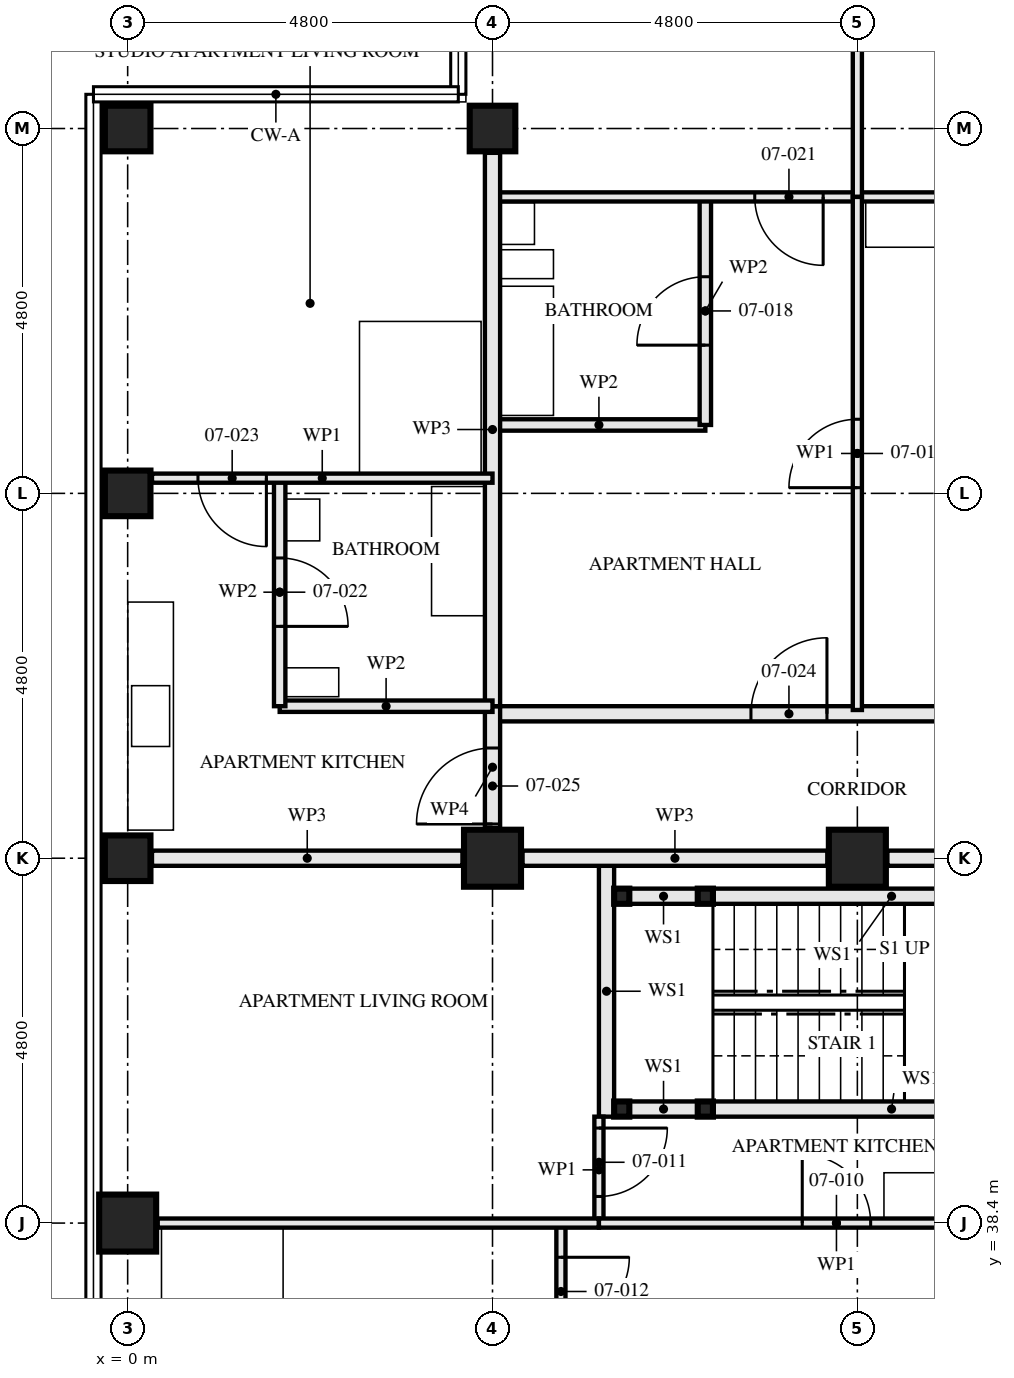
"""IFC4 building model, lengths in metres.
Left out: names, types, materials, properties, quantities, classifications, styles, units other than length and angle.
Written with IfcOpenShell. Run it as: python <this file> out.ifc"""

import sys

from ifc_helpers import new_model, si_unit, direction, frame, frame_2d, origin, origin_2d, place, context, subcontext, project, spatial, rectangle, hollow_rectangle, extrude, element, fill, save


model = new_model("IFC4")
c1 = context("Model", 3, precision=1e-05, world=origin(), true_north=direction((0.0, 1.0)))
c2 = subcontext(c1, "Body", "Model", "MODEL_VIEW")
j1 = project(units=[si_unit("LENGTHUNIT", "METRE"), si_unit("PLANEANGLEUNIT", "RADIAN")], contexts=[c1])
p1 = place(None, origin())
s1 = spatial("IfcSite", under=j1, at=p1, CompositionType="ELEMENT")
p2 = place(p1, origin())
s2 = spatial("IfcBuilding", under=s1, at=p2, CompositionType="ELEMENT")
p3 = place(p2, frame((0.0, 0.0, 30.5)))
s3 = spatial("IfcBuildingStorey", under=s2, at=p3, CompositionType="ELEMENT", Elevation=30.5)
p4 = place(p3, frame((0.0, 38.4, 0.0), z_axis=(0.0, 0.0, 1.0), x_axis=(1.0, 0.0, 0.0)))
e1 = element("IfcColumn", 1, at=p4, inside=s3, PredefinedType="COLUMN", context=c2, shape_type="SweptSolid", body=[
    extrude(hollow_rectangle(XDim=0.75, YDim=0.75, WallThickness=0.08, at=origin_2d()), origin(), (0.0, 0.0, 1.0), 3.5),
])
for number, where, z_axis, x_axis in (
    (2, (0.0, 43.2, 0.0), (0.0, 0.0, 1.0), (0.0, 1.0, 0.0)),
    (3, (0.0, 48.0, 0.0), (0.0, 0.0, 1.0), (1.0, 0.0, 0.0)),
    (4, (0.0, 52.8, 0.0), (0.0, 0.0, 1.0), (0.0, 1.0, 0.0)),
):
    element("IfcColumn", number, at=place(p3, frame(where, z_axis=z_axis, x_axis=x_axis)), inside=s3, PredefinedType="COLUMN", context=c2, shape_type="SweptSolid", body=[
        extrude(hollow_rectangle(XDim=0.6, YDim=0.6, WallThickness=0.08, at=origin_2d()), origin(), (0.0, 0.0, 1.0), 3.5),
    ])
p5 = place(p3, frame((4.8, 43.2, 0.0), z_axis=(0.0, 0.0, 1.0), x_axis=(0.0, 1.0, 0.0)))
e5 = element("IfcColumn", 5, at=p5, inside=s3, PredefinedType="COLUMN", context=c2, shape_type="SweptSolid", body=[
    extrude(hollow_rectangle(XDim=0.75, YDim=0.75, WallThickness=0.08, at=origin_2d()), origin(), (0.0, 0.0, 1.0), 3.5),
])
p6 = place(p3, frame((4.8, 52.8, 0.0), z_axis=(0.0, 0.0, 1.0), x_axis=(0.0, 1.0, 0.0)))
e6 = element("IfcColumn", 6, at=p6, inside=s3, PredefinedType="COLUMN", context=c2, shape_type="SweptSolid", body=[
    extrude(hollow_rectangle(XDim=0.6, YDim=0.6, WallThickness=0.08, at=origin_2d()), origin(), (0.0, 0.0, 1.0), 3.5),
])
p7 = place(p3, frame((9.6, 43.2, 0.0), z_axis=(0.0, 0.0, 1.0), x_axis=(0.0, 1.0, 0.0)))
e7 = element("IfcColumn", 7, at=p7, inside=s3, PredefinedType="COLUMN", context=c2, shape_type="SweptSolid", body=[
    extrude(hollow_rectangle(XDim=0.75, YDim=0.75, WallThickness=0.08, at=origin_2d()), origin(), (0.0, 0.0, 1.0), 3.5),
])
for number, where, z_axis, x_axis in (
    (8, (6.5, 42.7, 0.0), (0.0, 0.0, 1.0), (1.0, 0.0, 0.0)),
    (9, (6.5, 39.9, 0.0), (0.0, 0.0, 1.0), (1.0, 0.0, 0.0)),
    (10, (7.6, 42.7, 0.0), (0.0, 0.0, 1.0), (1.0, 0.0, 0.0)),
    (11, (7.6, 39.9, 0.0), (0.0, 0.0, 1.0), (1.0, 0.0, 0.0)),
):
    element("IfcColumn", number, at=place(p3, frame(where, z_axis=z_axis, x_axis=x_axis)), inside=s3, PredefinedType="COLUMN", context=c2, shape_type="SweptSolid", body=[
        extrude(hollow_rectangle(XDim=0.2, YDim=0.2, WallThickness=0.008, at=origin_2d()), origin(), (0.0, 0.0, 1.0), 3.33),
    ])
p8 = place(p3, frame((6.6, 42.7, 0.0), z_axis=(0.0, 0.0, 1.0), x_axis=(1.0, 0.0, 0.0)))
e12 = element("IfcWall", 12, at=p8, inside=s3, PredefinedType="SOLIDWALL", context=c2, shape_type="SweptSolid", body=[
    extrude(rectangle(XDim=0.9, YDim=0.2, at=frame_2d((0.45, 0.0))), origin(), (0.0, 0.0, 1.0), 2.99),
])
p9 = place(p3, frame((7.7, 42.7, 0.0), z_axis=(0.0, 0.0, 1.0), x_axis=(1.0, 0.0, 0.0)))
e13 = element("IfcWall", 13, at=p9, inside=s3, PredefinedType="SOLIDWALL", context=c2, shape_type="SweptSolid", body=[
    extrude(rectangle(XDim=4.7, YDim=0.2, at=frame_2d((2.35, 0.0))), origin(), (0.0, 0.0, 1.0), 2.99),
])
p10 = place(p3, frame((6.6, 39.9, 0.0), z_axis=(0.0, 0.0, 1.0), x_axis=(1.0, 0.0, 0.0)))
e14 = element("IfcWall", 14, at=p10, inside=s3, PredefinedType="SOLIDWALL", context=c2, shape_type="SweptSolid", body=[
    extrude(rectangle(XDim=0.9, YDim=0.2, at=frame_2d((0.45, 0.0))), origin(), (0.0, 0.0, 1.0), 2.99),
])
p11 = place(p3, frame((7.7, 39.9, 0.0), z_axis=(0.0, 0.0, 1.0), x_axis=(1.0, 0.0, 0.0)))
e15 = element("IfcWall", 15, at=p11, inside=s3, PredefinedType="SOLIDWALL", context=c2, shape_type="SweptSolid", body=[
    extrude(rectangle(XDim=4.7, YDim=0.2, at=frame_2d((2.35, 0.0))), origin(), (0.0, 0.0, 1.0), 2.99),
])
p12 = place(p3, frame((6.3, 43.1, 0.0), z_axis=(0.0, 0.0, 1.0), x_axis=(0.0, -1.0, 0.0)))
e16 = element("IfcWall", 16, at=p12, inside=s3, PredefinedType="SOLIDWALL", context=c2, shape_type="SweptSolid", body=[
    extrude(rectangle(XDim=3.3, YDim=0.2, at=frame_2d((1.65, 0.0))), origin(), (0.0, 0.0, 1.0), 3.33),
])
p13 = place(p3, frame((6.2, 38.4, 0.0), z_axis=(0.0, 0.0, 1.0), x_axis=(1.0, 0.0, 0.0)))
e17 = element("IfcWall", 17, at=p13, inside=s3, PredefinedType="PARTITIONING", context=c2, shape_type="SweptSolid", body=[
    extrude(rectangle(XDim=6.25, YDim=0.12, at=frame_2d((3.125, 0.0))), origin(), (0.0, 0.0, 1.0), 2.55),
])
p14 = place(p13, frame((2.675, 0.0, 0.0)))
e18 = element("IfcOpeningElement", 18, at=p14, cuts=e17, PredefinedType="OPENING", context=c2, shape_type="SweptSolid", body=[
    extrude(rectangle(XDim=0.9, YDim=2.1, at=frame_2d((0.45, 1.05))), frame((0.0, 0.071, 0.0), z_axis=(0.0, -1.0, 0.0), x_axis=(1.0, 0.0, 0.0)), (0.0, 0.0, 1.0), 0.141),
])
p15 = place(p3, frame((6.2, 39.8, 0.0), z_axis=(0.0, 0.0, 1.0), x_axis=(0.0, -1.0, 0.0)))
e19 = element("IfcWall", 19, at=p15, inside=s3, PredefinedType="PARTITIONING", context=c2, shape_type="SweptSolid", body=[
    extrude(rectangle(XDim=1.4, YDim=0.12, at=frame_2d((0.7, 0.0))), origin(), (0.0, 0.0, 1.0), 3.33),
])
p16 = place(p15, frame((0.15, 0.0, 0.0)))
e20 = element("IfcOpeningElement", 20, at=p16, cuts=e19, PredefinedType="OPENING", context=c2, shape_type="SweptSolid", body=[
    extrude(rectangle(XDim=0.9, YDim=2.1, at=frame_2d((0.45, 1.05))), frame((0.0, 0.071, 0.0), z_axis=(0.0, -1.0, 0.0), x_axis=(1.0, 0.0, 0.0)), (0.0, 0.0, 1.0), 0.141),
])
p17 = place(p3, frame((5.7, 38.4, 0.0), z_axis=(0.0, 0.0, 1.0), x_axis=(0.0, -1.0, 0.0)))
e21 = element("IfcWall", 21, at=p17, inside=s3, PredefinedType="PARTITIONING", context=c2, shape_type="SweptSolid", body=[
    extrude(rectangle(XDim=4.8, YDim=0.12, at=frame_2d((2.4, 0.0))), origin(), (0.0, 0.0, 1.0), 3.33),
])
p18 = place(p17, frame((0.45, 0.0, 0.0)))
e22 = element("IfcOpeningElement", 22, at=p18, cuts=e21, PredefinedType="OPENING", context=c2, shape_type="SweptSolid", body=[
    extrude(rectangle(XDim=0.9, YDim=2.1, at=frame_2d((0.45, 1.05))), frame((0.0, 0.071, 0.0), z_axis=(0.0, -1.0, 0.0), x_axis=(1.0, 0.0, 0.0)), (0.0, 0.0, 1.0), 0.141),
])
p19 = place(p3, frame((0.395, 38.4, 0.0), z_axis=(0.0, 0.0, 1.0), x_axis=(1.0, 0.0, 0.0)))
e23 = element("IfcWall", 23, at=p19, inside=s3, PredefinedType="PARTITIONING", context=c2, shape_type="SweptSolid", body=[
    extrude(rectangle(XDim=5.805, YDim=0.12, at=frame_2d((2.902, 0.0))), origin(), (0.0, 0.0, 1.0), 2.55),
])
p20 = place(p3, frame((7.6, 51.9, 0.0), z_axis=(0.0, 0.0, 1.0), x_axis=(0.0, -1.0, 0.0)))
e24 = element("IfcWall", 24, at=p20, inside=s3, PredefinedType="PARTITIONING", context=c2, shape_type="SweptSolid", body=[
    extrude(rectangle(XDim=3.0, YDim=0.15, at=frame_2d((1.5, 0.0))), origin(), (0.0, 0.0, 1.0), 3.33),
])
p21 = place(p20, frame((1.05, 0.0, 0.0)))
e25 = element("IfcOpeningElement", 25, at=p21, cuts=e24, PredefinedType="OPENING", context=c2, shape_type="SweptSolid", body=[
    extrude(rectangle(XDim=0.9, YDim=2.1, at=frame_2d((0.45, 1.05))), frame((0.0, 0.085, 0.0), z_axis=(0.0, -1.0, 0.0), x_axis=(1.0, 0.0, 0.0)), (0.0, 0.0, 1.0), 0.171),
])
p22 = place(p3, frame((7.6, 48.9, 0.0), z_axis=(0.0, 0.0, 1.0), x_axis=(-1.0, 0.0, 0.0)))
e26 = element("IfcWall", 26, at=p22, inside=s3, PredefinedType="PARTITIONING", context=c2, shape_type="SweptSolid", body=[
    extrude(rectangle(XDim=2.8, YDim=0.15, at=frame_2d((1.4, 0.0))), origin(), (0.0, 0.0, 1.0), 3.33),
])
p23 = place(p3, frame((9.6, 51.9, 0.0), z_axis=(0.0, 0.0, 1.0), x_axis=(0.0, -1.0, 0.0)))
e27 = element("IfcWall", 27, at=p23, inside=s3, PredefinedType="PARTITIONING", context=c2, shape_type="SweptSolid", body=[
    extrude(rectangle(XDim=6.75, YDim=0.12, at=frame_2d((3.375, 0.0))), origin(), (0.0, 0.0, 1.0), 2.55),
])
p24 = place(p23, frame((2.925, 0.0, 0.0)))
e28 = element("IfcOpeningElement", 28, at=p24, cuts=e27, PredefinedType="OPENING", context=c2, shape_type="SweptSolid", body=[
    extrude(rectangle(XDim=0.9, YDim=2.1, at=frame_2d((0.45, 1.05))), frame((0.0, 0.071, 0.0), z_axis=(0.0, -1.0, 0.0), x_axis=(1.0, 0.0, 0.0)), (0.0, 0.0, 1.0), 0.141),
])
p25 = place(p3, frame((14.4, 51.9, 0.0), z_axis=(0.0, 0.0, 1.0), x_axis=(-1.0, 0.0, 0.0)))
e29 = element("IfcWall", 29, at=p25, inside=s3, PredefinedType="PARTITIONING", context=c2, shape_type="SweptSolid", body=[
    extrude(rectangle(XDim=4.8, YDim=0.12, at=frame_2d((2.4, 0.0))), origin(), (0.0, 0.0, 1.0), 3.33),
])
p26 = place(p25, frame((0.45, 0.0, 0.0)))
e30 = element("IfcOpeningElement", 30, at=p26, cuts=e29, PredefinedType="OPENING", context=c2, shape_type="SweptSolid", body=[
    extrude(rectangle(XDim=0.9, YDim=2.1, at=frame_2d((0.45, 1.05))), frame((0.0, 0.071, 0.0), z_axis=(0.0, -1.0, 0.0), x_axis=(1.0, 0.0, 0.0)), (0.0, 0.0, 1.0), 0.141),
])
p27 = place(p3, frame((9.6, 51.9, 0.0), z_axis=(0.0, 0.0, 1.0), x_axis=(-1.0, 0.0, 0.0)))
e31 = element("IfcWall", 31, at=p27, inside=s3, PredefinedType="PARTITIONING", context=c2, shape_type="SweptSolid", body=[
    extrude(rectangle(XDim=4.8, YDim=0.12, at=frame_2d((2.4, 0.0))), origin(), (0.0, 0.0, 1.0), 3.33),
])
p28 = place(p27, frame((0.45, 0.0, 0.0)))
e32 = element("IfcOpeningElement", 32, at=p28, cuts=e31, PredefinedType="OPENING", context=c2, shape_type="SweptSolid", body=[
    extrude(rectangle(XDim=0.9, YDim=2.1, at=frame_2d((0.45, 1.05))), frame((0.0, 0.071, 0.0), z_axis=(0.0, -1.0, 0.0), x_axis=(1.0, 0.0, 0.0)), (0.0, 0.0, 1.0), 0.141),
])
p29 = place(p3, frame((9.6, 57.28, 0.0), z_axis=(0.0, 0.0, 1.0), x_axis=(0.0, -1.0, 0.0)))
e33 = element("IfcWall", 33, at=p29, inside=s3, PredefinedType="PARTITIONING", context=c2, shape_type="SweptSolid", body=[
    extrude(rectangle(XDim=5.38, YDim=0.12, at=frame_2d((2.69, 0.0))), origin(), (0.0, 0.0, 1.0), 2.55),
])
p30 = place(p3, frame((4.8, 52.48, 0.0), z_axis=(0.0, 0.0, 1.0), x_axis=(0.0, -1.0, 0.0)))
e34 = element("IfcWall", 34, at=p30, inside=s3, PredefinedType="PARTITIONING", context=c2, shape_type="SweptSolid", body=[
    extrude(rectangle(XDim=7.28, YDim=0.2, at=frame_2d((3.64, 0.0))), origin(), (0.0, 0.0, 1.0), 2.55),
])
p31 = place(p3, frame((2.0, 48.2, 0.0), z_axis=(0.0, 0.0, 1.0), x_axis=(0.0, -1.0, 0.0)))
e35 = element("IfcWall", 35, at=p31, inside=s3, PredefinedType="PARTITIONING", context=c2, shape_type="SweptSolid", body=[
    extrude(rectangle(XDim=3.0, YDim=0.15, at=frame_2d((1.5, 0.0))), origin(), (0.0, 0.0, 1.0), 2.55),
])
p32 = place(p31, frame((1.05, 0.0, 0.0)))
e36 = element("IfcOpeningElement", 36, at=p32, cuts=e35, PredefinedType="OPENING", context=c2, shape_type="SweptSolid", body=[
    extrude(rectangle(XDim=0.9, YDim=2.1, at=frame_2d((0.45, 1.05))), frame((0.0, 0.085, 0.0), z_axis=(0.0, -1.0, 0.0), x_axis=(1.0, 0.0, 0.0)), (0.0, 0.0, 1.0), 0.171),
])
p33 = place(p3, frame((4.8, 45.2, 0.0), z_axis=(0.0, 0.0, 1.0), x_axis=(-1.0, 0.0, 0.0)))
e37 = element("IfcWall", 37, at=p33, inside=s3, PredefinedType="PARTITIONING", context=c2, shape_type="SweptSolid", body=[
    extrude(rectangle(XDim=2.8, YDim=0.15, at=frame_2d((1.4, 0.0))), origin(), (0.0, 0.0, 1.0), 3.33),
])
p34 = place(p3, frame((4.8, 48.2, 0.0), z_axis=(0.0, 0.0, 1.0), x_axis=(-1.0, 0.0, 0.0)))
e38 = element("IfcWall", 38, at=p34, inside=s3, PredefinedType="PARTITIONING", context=c2, shape_type="SweptSolid", body=[
    extrude(rectangle(XDim=4.48, YDim=0.12, at=frame_2d((2.24, 0.0))), origin(), (0.0, 0.0, 1.0), 3.33),
])
p35 = place(p34, frame((2.975, 0.0, 0.0)))
e39 = element("IfcOpeningElement", 39, at=p35, cuts=e38, PredefinedType="OPENING", context=c2, shape_type="SweptSolid", body=[
    extrude(rectangle(XDim=0.9, YDim=2.1, at=frame_2d((0.45, 1.05))), frame((0.0, 0.071, 0.0), z_axis=(0.0, -1.0, 0.0), x_axis=(1.0, 0.0, 0.0)), (0.0, 0.0, 1.0), 0.141),
])
p36 = place(p3, frame((14.4, 45.1, 0.0), z_axis=(0.0, 0.0, 1.0), x_axis=(-1.0, 0.0, 0.0)))
e40 = element("IfcWall", 40, at=p36, inside=s3, PredefinedType="PARTITIONING", context=c2, shape_type="SweptSolid", body=[
    extrude(rectangle(XDim=9.6, YDim=0.2, at=frame_2d((4.8, 0.0))), origin(), (0.0, 0.0, 1.0), 3.33),
])
p37 = place(p36, frame((5.2, 0.0, 0.0)))
e41 = element("IfcOpeningElement", 41, at=p37, cuts=e40, PredefinedType="OPENING", context=c2, shape_type="SweptSolid", body=[
    extrude(rectangle(XDim=1.0, YDim=2.1, at=frame_2d((0.5, 1.05))), frame((0.0, 0.111, 0.0), z_axis=(0.0, -1.0, 0.0), x_axis=(1.0, 0.0, 0.0)), (0.0, 0.0, 1.0), 0.221),
])
p38 = place(p3, frame((4.8, 45.2, 0.0), z_axis=(0.0, 0.0, 1.0), x_axis=(0.0, -1.0, 0.0)))
e42 = element("IfcWall", 42, at=p38, inside=s3, PredefinedType="PARTITIONING", context=c2, shape_type="SweptSolid", body=[
    extrude(rectangle(XDim=1.605, YDim=0.2, at=frame_2d((0.802, 0.0))), origin(), (0.0, 0.0, 1.0), 3.33),
])
p39 = place(p38, frame((0.55, 0.0, 0.0)))
e43 = element("IfcOpeningElement", 43, at=p39, cuts=e42, PredefinedType="OPENING", context=c2, shape_type="SweptSolid", body=[
    extrude(rectangle(XDim=1.0, YDim=2.1, at=frame_2d((0.5, 1.05))), frame((0.0, 0.111, 0.0), z_axis=(0.0, -1.0, 0.0), x_axis=(1.0, 0.0, 0.0)), (0.0, 0.0, 1.0), 0.221),
])
p40 = place(p3, frame((12.5, 43.2, 0.0), z_axis=(0.0, 0.0, 1.0), x_axis=(-1.0, 0.0, 0.0)))
e44 = element("IfcWall", 44, at=p40, inside=s3, PredefinedType="PARTITIONING", context=c2, shape_type="SweptSolid", body=[
    extrude(rectangle(XDim=2.505, YDim=0.2, at=frame_2d((1.252, 0.0))), origin(), (0.0, 0.0, 1.0), 2.32),
])
p41 = place(p3, frame((9.205, 43.2, 0.0), z_axis=(0.0, 0.0, 1.0), x_axis=(-1.0, 0.0, 0.0)))
e45 = element("IfcWall", 45, at=p41, inside=s3, PredefinedType="PARTITIONING", context=c2, shape_type="SweptSolid", body=[
    extrude(rectangle(XDim=4.01, YDim=0.2, at=frame_2d((2.005, 0.0))), origin(), (0.0, 0.0, 1.0), 2.32),
])
p42 = place(p3, frame((4.405, 43.2, 0.0), z_axis=(0.0, 0.0, 1.0), x_axis=(-1.0, 0.0, 0.0)))
e46 = element("IfcWall", 46, at=p42, inside=s3, PredefinedType="PARTITIONING", context=c2, shape_type="SweptSolid", body=[
    extrude(rectangle(XDim=4.085, YDim=0.2, at=frame_2d((2.042, 0.0))), origin(), (0.0, 0.0, 1.0), 2.32),
])
p43 = place(p14, origin())
e47 = element("IfcDoor", 47, at=p43, inside=s3, OperationType="SINGLE_SWING_RIGHT", PredefinedType="DOOR", context=c2, shape_type="SweptSolid", body=[
    extrude(rectangle(XDim=0.9, YDim=2.1, at=frame_2d((0.45, 1.05))), frame((0.0, 0.022, 0.0), z_axis=(0.0, -1.0, 0.0), x_axis=(1.0, 0.0, 0.0)), (0.0, 0.0, 1.0), 0.044),
])
fill(e18, e47)
p44 = place(p16, origin())
e48 = element("IfcDoor", 48, at=p44, inside=s3, OperationType="SINGLE_SWING_RIGHT", PredefinedType="DOOR", context=c2, shape_type="SweptSolid", body=[
    extrude(rectangle(XDim=0.9, YDim=2.1, at=frame_2d((0.45, 1.05))), frame((0.0, 0.022, 0.0), z_axis=(0.0, -1.0, 0.0), x_axis=(1.0, 0.0, 0.0)), (0.0, 0.0, 1.0), 0.044),
])
fill(e20, e48)
p45 = place(p18, origin())
e49 = element("IfcDoor", 49, at=p45, inside=s3, OperationType="SINGLE_SWING_RIGHT", PredefinedType="DOOR", context=c2, shape_type="SweptSolid", body=[
    extrude(rectangle(XDim=0.9, YDim=2.1, at=frame_2d((0.45, 1.05))), frame((0.0, 0.022, 0.0), z_axis=(0.0, -1.0, 0.0), x_axis=(1.0, 0.0, 0.0)), (0.0, 0.0, 1.0), 0.044),
])
fill(e22, e49)
p46 = place(p21, frame((0.9, 0.0, 0.0), z_axis=(0.0, 0.0, 1.0), x_axis=(-1.0, 0.0, 0.0)))
e50 = element("IfcDoor", 50, at=p46, inside=s3, OperationType="SINGLE_SWING_RIGHT", PredefinedType="DOOR", context=c2, shape_type="SweptSolid", body=[
    extrude(rectangle(XDim=0.9, YDim=2.1, at=frame_2d((0.45, 1.05))), frame((0.0, 0.022, 0.0), z_axis=(0.0, -1.0, 0.0), x_axis=(1.0, 0.0, 0.0)), (0.0, 0.0, 1.0), 0.044),
])
fill(e25, e50)
p47 = place(p24, frame((0.9, 0.0, 0.0), z_axis=(0.0, 0.0, 1.0), x_axis=(-1.0, 0.0, 0.0)))
e51 = element("IfcDoor", 51, at=p47, inside=s3, OperationType="SINGLE_SWING_RIGHT", PredefinedType="DOOR", context=c2, shape_type="SweptSolid", body=[
    extrude(rectangle(XDim=0.9, YDim=2.1, at=frame_2d((0.45, 1.05))), frame((0.0, 0.022, 0.0), z_axis=(0.0, -1.0, 0.0), x_axis=(1.0, 0.0, 0.0)), (0.0, 0.0, 1.0), 0.044),
])
fill(e28, e51)
p48 = place(p28, origin())
e52 = element("IfcDoor", 52, at=p48, inside=s3, OperationType="SINGLE_SWING_RIGHT", PredefinedType="DOOR", context=c2, shape_type="SweptSolid", body=[
    extrude(rectangle(XDim=0.9, YDim=2.1, at=frame_2d((0.45, 1.05))), frame((0.0, 0.022, 0.0), z_axis=(0.0, -1.0, 0.0), x_axis=(1.0, 0.0, 0.0)), (0.0, 0.0, 1.0), 0.044),
])
fill(e32, e52)
p49 = place(p32, origin())
e53 = element("IfcDoor", 53, at=p49, inside=s3, OperationType="SINGLE_SWING_LEFT", PredefinedType="DOOR", context=c2, shape_type="SweptSolid", body=[
    extrude(rectangle(XDim=0.9, YDim=2.1, at=frame_2d((0.45, 1.05))), frame((0.0, 0.022, 0.0), z_axis=(0.0, -1.0, 0.0), x_axis=(1.0, 0.0, 0.0)), (0.0, 0.0, 1.0), 0.044),
])
fill(e36, e53)
p50 = place(p35, origin())
e54 = element("IfcDoor", 54, at=p50, inside=s3, OperationType="SINGLE_SWING_RIGHT", PredefinedType="DOOR", context=c2, shape_type="SweptSolid", body=[
    extrude(rectangle(XDim=0.9, YDim=2.1, at=frame_2d((0.45, 1.05))), frame((0.0, 0.022, 0.0), z_axis=(0.0, -1.0, 0.0), x_axis=(1.0, 0.0, 0.0)), (0.0, 0.0, 1.0), 0.044),
])
fill(e39, e54)
p51 = place(p37, frame((1.0, 0.0, 0.0), z_axis=(0.0, 0.0, 1.0), x_axis=(-1.0, 0.0, 0.0)))
e55 = element("IfcDoor", 55, at=p51, inside=s3, OperationType="SINGLE_SWING_LEFT", PredefinedType="DOOR", context=c2, shape_type="SweptSolid", body=[
    extrude(rectangle(XDim=1.0, YDim=2.1, at=frame_2d((0.5, 1.05))), frame((0.0, 0.027, 0.0), z_axis=(0.0, -1.0, 0.0), x_axis=(1.0, 0.0, 0.0)), (0.0, 0.0, 1.0), 0.054),
])
fill(e41, e55)
p52 = place(p39, frame((1.0, 0.0, 0.0), z_axis=(0.0, 0.0, 1.0), x_axis=(-1.0, 0.0, 0.0)))
e56 = element("IfcDoor", 56, at=p52, inside=s3, OperationType="SINGLE_SWING_RIGHT", PredefinedType="DOOR", context=c2, shape_type="SweptSolid", body=[
    extrude(rectangle(XDim=1.0, YDim=2.1, at=frame_2d((0.5, 1.05))), frame((0.0, 0.027, 0.0), z_axis=(0.0, -1.0, 0.0), x_axis=(1.0, 0.0, 0.0)), (0.0, 0.0, 1.0), 0.054),
])
fill(e43, e56)
save(model, sys.argv[1])
